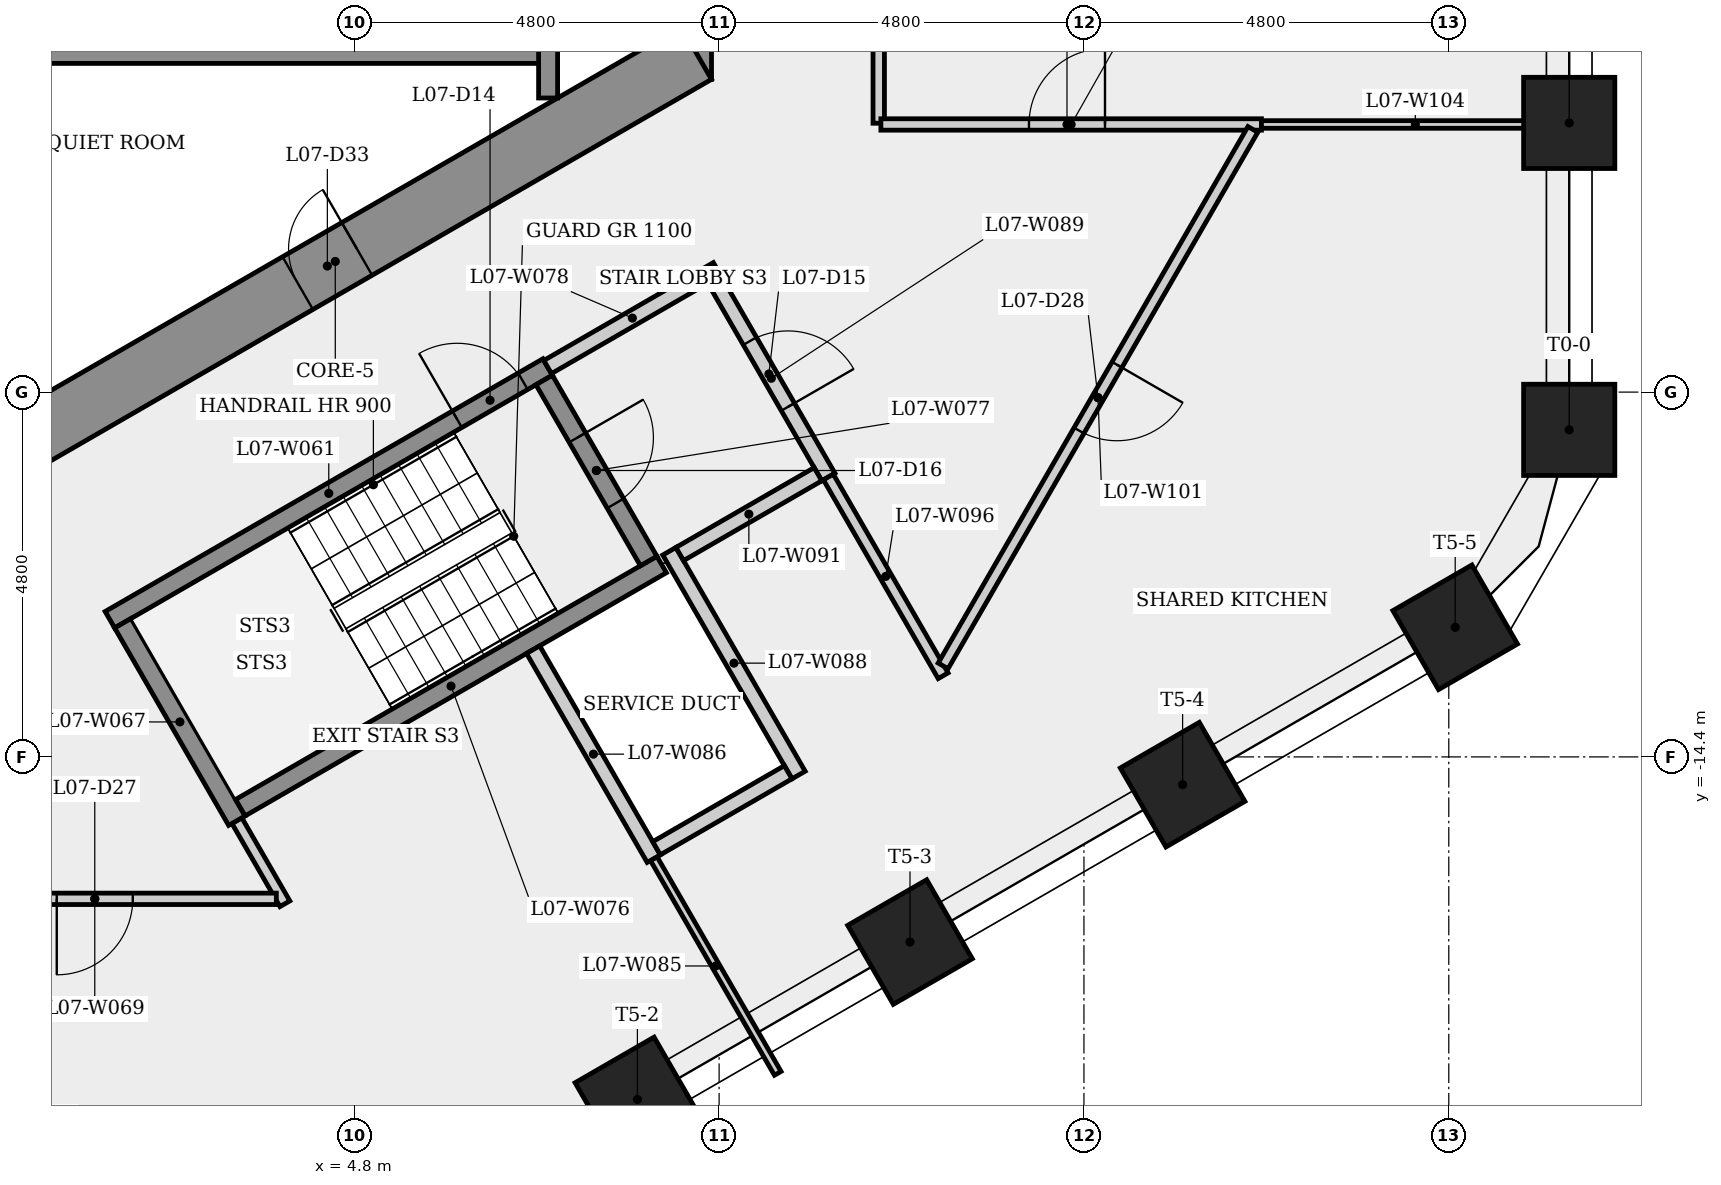
"""IFC4 building model, lengths in metres.
Left out: names, types, materials, properties, quantities, classifications, styles, units other than length and angle.
Written with IfcOpenShell. Run it as: python <this file> out.ifc"""

import sys

from ifc_helpers import new_model, si_unit, direction, frame, frame_2d, origin, origin_2d, place, context, subcontext, project, spatial, rectangle, extrude, element, fill, save


model = new_model("IFC4")
c1 = context("Model", 3, precision=1e-05, world=origin(), true_north=direction((0.0, 1.0)))
c2 = subcontext(c1, "Body", "Model", "MODEL_VIEW")
j1 = project(units=[si_unit("LENGTHUNIT", "METRE"), si_unit("PLANEANGLEUNIT", "RADIAN")], contexts=[c1])
p1 = place(None, origin())
s1 = spatial("IfcSite", under=j1, at=p1, CompositionType="ELEMENT")
p2 = place(p1, origin())
s2 = spatial("IfcBuilding", under=s1, at=p2, CompositionType="ELEMENT")
p3 = place(p2, frame((0.0, 0.0, 32.3)))
s3 = spatial("IfcBuildingStorey", under=s2, at=p3, CompositionType="ELEMENT", Elevation=32.3)
p4 = place(p3, frame((9.1, -5.485, 0.0), z_axis=(0.0, 0.0, 1.0), x_axis=(0.0, 1.0, 0.0)))
e1 = element("IfcWall", 1, at=p4, inside=s3, PredefinedType="SHEAR", context=c2, shape_type="SweptSolid", body=[
    extrude(rectangle(XDim=10.97, YDim=0.8, at=frame_2d((5.485, 0.0))), origin(), (0.0, 0.0, 1.0), 3.4),
])
p5 = place(p4, frame((4.685, 0.0, 0.0)))
e2 = element("IfcOpeningElement", 2, at=p5, cuts=e1, PredefinedType="OPENING", context=c2, shape_type="SweptSolid", body=[
    extrude(rectangle(XDim=1.6, YDim=2.1, at=frame_2d((0.8, 1.05))), frame((0.0, 0.41, 0.0), z_axis=(0.0, -1.0, 0.0), x_axis=(1.0, 0.0, 0.0)), (0.0, 0.0, 1.0), 0.82),
])
p6 = place(p3, frame((-0.2, -10.623, 0.0), z_axis=(0.0, 0.0, 1.0), x_axis=(0.866023993627, 0.500002442456, 0.0)))
e3 = element("IfcWall", 3, at=p6, inside=s3, PredefinedType="SHEAR", context=c2, shape_type="SweptSolid", body=[
    extrude(rectangle(XDim=10.97, YDim=0.8, at=frame_2d((5.485, 0.0))), origin(), (0.0, 0.0, 1.0), 3.4),
])
p7 = place(p6, frame((4.914, 0.0, 0.0)))
e4 = element("IfcOpeningElement", 4, at=p7, cuts=e3, PredefinedType="OPENING", context=c2, shape_type="SweptSolid", body=[
    extrude(rectangle(XDim=0.9, YDim=2.1, at=frame_2d((0.45, 1.05))), frame((0.0, 0.41, 0.0), z_axis=(0.0, -1.0, 0.0), x_axis=(1.0, 0.0, 0.0)), (0.0, 0.0, 1.0), 0.82),
])
for number, where, z_axis, x_axis in (
    (5, (20.785, -10.097, 0.0), (0.0, 0.0, 1.0), (1.0, 0.0, 0.0)),
    (6, (20.785, -6.058, 0.0), (0.0, 0.0, 1.0), (1.0, 0.0, 0.0)),
    (7, (8.525, -18.907, 0.0), (0.0, 0.0, 1.0), (0.5, -0.866, 0.0)),
    (8, (12.111, -16.836, 0.0), (0.0, 0.0, 1.0), (0.5, -0.866, 0.0)),
    (9, (15.698, -14.765, 0.0), (0.0, 0.0, 1.0), (0.5, -0.866, 0.0)),
    (10, (19.285, -12.695, 0.0), (0.0, 0.0, 1.0), (0.5, -0.866, 0.0)),
):
    element("IfcColumn", number, at=place(p3, frame(where, z_axis=z_axis, x_axis=x_axis)), inside=s3, PredefinedType="COLUMN", context=c2, shape_type="SweptSolid", body=[
        extrude(rectangle(XDim=1.2, YDim=1.2, at=origin_2d()), origin(), (0.0, 0.0, 1.0), 3.4),
    ])
p8 = place(p3, frame((-7.225, -5.15, 0.0), z_axis=(0.0, 0.0, 1.0), x_axis=(1.0, 0.0, 0.0)))
e11 = element("IfcWall", 11, at=p8, inside=s3, PredefinedType="SHEAR", context=c2, shape_type="SweptSolid", body=[
    extrude(rectangle(XDim=14.7, YDim=0.25, at=frame_2d((7.35, 0.0))), origin(), (0.0, 0.0, 1.0), 3.05),
])
p9 = place(p3, frame((1.585, -12.595, 0.0), z_axis=(0.0, 0.0, 1.0), x_axis=(0.866036417653, 0.499980922934, 0.0)))
e12 = element("IfcWall", 12, at=p9, inside=s3, PredefinedType="SHEAR", context=c2, shape_type="SweptSolid", body=[
    extrude(rectangle(XDim=6.65, YDim=0.25, at=frame_2d((3.325, 0.0))), origin(), (0.0, 0.0, 1.0), 3.05),
])
p10 = place(p9, frame((5.275, 0.0, 0.0)))
e13 = element("IfcOpeningElement", 13, at=p10, cuts=e12, PredefinedType="OPENING", context=c2, shape_type="SweptSolid", body=[
    extrude(rectangle(XDim=1.0, YDim=2.1, at=frame_2d((0.5, 1.05))), frame((0.0, 0.135, 0.0), z_axis=(0.0, -1.0, 0.0), x_axis=(1.0, 0.0, 0.0)), (0.0, 0.0, 1.0), 0.27),
])
p11 = place(p3, frame((3.256, -15.239, 0.0), z_axis=(0.0, 0.0, 1.0), x_axis=(0.500006981563, -0.86602137294, 0.0)))
e14 = element("IfcWall", 14, at=p11, inside=s3, PredefinedType="PARTITIONING", context=c2, shape_type="SweptSolid", body=[
    extrude(rectangle(XDim=1.263, YDim=0.15, at=frame_2d((0.631, 0.0))), origin(), (0.0, 0.0, 1.0), 3.05),
])
p12 = place(p3, frame((3.256, -15.239, 0.0), z_axis=(0.0, 0.0, 1.0), x_axis=(-0.50002537861, 0.866010750942, 0.0)))
e15 = element("IfcWall", 15, at=p12, inside=s3, PredefinedType="SHEAR", context=c2, shape_type="SweptSolid", body=[
    extrude(rectangle(XDim=3.0, YDim=0.25, at=frame_2d((1.5, 0.0))), origin(), (0.0, 0.0, 1.0), 3.05),
])
p13 = place(p3, frame((3.774, -16.267, 0.0), z_axis=(0.0, 0.0, 1.0), x_axis=(-1.0, 0.0, 0.0)))
e16 = element("IfcWall", 16, at=p13, inside=s3, PredefinedType="PARTITIONING", context=c2, shape_type="SweptSolid", body=[
    extrude(rectangle(XDim=4.778, YDim=0.15, at=frame_2d((2.389, 0.0))), origin(), (0.0, 0.0, 1.0), 3.05),
])
p14 = place(p13, frame((1.889, 0.0, 0.0)))
e17 = element("IfcOpeningElement", 17, at=p14, cuts=e16, PredefinedType="OPENING", context=c2, shape_type="SweptSolid", body=[
    extrude(rectangle(XDim=1.0, YDim=2.1, at=frame_2d((0.5, 1.05))), frame((0.0, 0.085, 0.0), z_axis=(0.0, -1.0, 0.0), x_axis=(1.0, 0.0, 0.0)), (0.0, 0.0, 1.0), 0.17),
])
p15 = place(p3, frame((3.301, -15.068, 0.0), z_axis=(0.0, 0.0, 1.0), x_axis=(0.866035036182, 0.499983315828, 0.0)))
e18 = element("IfcWall", 18, at=p15, inside=s3, PredefinedType="SHEAR", context=c2, shape_type="SweptSolid", body=[
    extrude(rectangle(XDim=6.4, YDim=0.25, at=frame_2d((3.2, 0.0))), origin(), (0.0, 0.0, 1.0), 3.05),
])
p16 = place(p3, frame((7.298, -9.441, 0.0), z_axis=(0.0, 0.0, 1.0), x_axis=(0.500034990121, -0.866005201286, 0.0)))
e19 = element("IfcWall", 19, at=p16, inside=s3, PredefinedType="SHEAR", context=c2, shape_type="SweptSolid", body=[
    extrude(rectangle(XDim=2.75, YDim=0.25, at=frame_2d((1.375, 0.0))), origin(), (0.0, 0.0, 1.0), 3.05),
])
p17 = place(p16, frame((0.875, 0.0, 0.0)))
e20 = element("IfcOpeningElement", 20, at=p17, cuts=e19, PredefinedType="OPENING", context=c2, shape_type="SweptSolid", body=[
    extrude(rectangle(XDim=1.0, YDim=2.1, at=frame_2d((0.5, 1.05))), frame((0.0, 0.135, 0.0), z_axis=(0.0, -1.0, 0.0), x_axis=(1.0, 0.0, 0.0)), (0.0, 0.0, 1.0), 0.27),
])
p18 = place(p3, frame((7.344, -9.27, 0.0), z_axis=(0.0, 0.0, 1.0), x_axis=(0.866005588531, 0.500034319456, 0.0)))
e21 = element("IfcWall", 21, at=p18, inside=s3, PredefinedType="PARTITIONING", context=c2, shape_type="SweptSolid", body=[
    extrude(rectangle(XDim=2.575, YDim=0.2, at=frame_2d((1.288, 0.0))), origin(), (0.0, 0.0, 1.0), 3.05),
])
p19 = place(p3, frame((7.35, -1.925, 0.0), z_axis=(0.0, 0.0, 1.0), x_axis=(0.0, -1.0, 0.0)))
e22 = element("IfcWall", 22, at=p19, inside=s3, PredefinedType="SHEAR", context=c2, shape_type="SweptSolid", body=[
    extrude(rectangle(XDim=3.805, YDim=0.25, at=frame_2d((1.903, 0.0))), origin(), (0.0, 0.0, 1.0), 3.05),
])
p20 = place(p3, frame((8.74, -15.738, 0.0), z_axis=(0.0, 0.0, 1.0), x_axis=(0.499994537821, -0.866028557352, 0.0)))
e23 = element("IfcWall", 23, at=p20, inside=s3, PredefinedType="PARTITIONING", context=c2, shape_type="SweptSolid", body=[
    extrude(rectangle(XDim=3.262, YDim=0.1, at=frame_2d((1.631, 0.0))), origin(), (0.0, 0.0, 1.0), 3.05),
])
p21 = place(p3, frame((8.74, -15.739, 0.0), z_axis=(0.0, 0.0, 1.0), x_axis=(-0.500017526161, 0.866015284814, 0.0)))
e24 = element("IfcWall", 24, at=p21, inside=s3, PredefinedType="PLUMBINGWALL", context=c2, shape_type="SweptSolid", body=[
    extrude(rectangle(XDim=3.175, YDim=0.2, at=frame_2d((1.588, 0.0))), origin(), (0.0, 0.0, 1.0), 3.05),
])
p22 = place(p3, frame((8.945, -11.694, 0.0), z_axis=(0.0, 0.0, 1.0), x_axis=(0.500062241894, -0.865989465428, 0.0)))
e25 = element("IfcWall", 25, at=p22, inside=s3, PredefinedType="PLUMBINGWALL", context=c2, shape_type="SweptSolid", body=[
    extrude(rectangle(XDim=3.4, YDim=0.2, at=frame_2d((1.7, 0.0))), origin(), (0.0, 0.0, 1.0), 3.05),
])
p23 = place(p3, frame((9.537, -8.119, 0.0), z_axis=(0.0, 0.0, 1.0), x_axis=(0.499990139034, -0.866031096941, 0.0)))
e26 = element("IfcWall", 26, at=p23, inside=s3, PredefinedType="PARTITIONING", context=c2, shape_type="SweptSolid", body=[
    extrude(rectangle(XDim=3.0, YDim=0.2, at=frame_2d((1.5, 0.0))), origin(), (0.0, 0.0, 1.0), 3.05),
])
p24 = place(p23, frame((0.935, 0.0, 0.0)))
e27 = element("IfcOpeningElement", 27, at=p24, cuts=e26, PredefinedType="OPENING", context=c2, shape_type="SweptSolid", body=[
    extrude(rectangle(XDim=1.0, YDim=2.1, at=frame_2d((0.5, 1.05))), frame((0.0, 0.11, 0.0), z_axis=(0.0, -1.0, 0.0), x_axis=(1.0, 0.0, 0.0)), (0.0, 0.0, 1.0), 0.22),
])
p25 = place(p3, frame((10.509, -14.602, 0.0), z_axis=(0.0, 0.0, 1.0), x_axis=(-0.866010750942, -0.50002537861, 0.0)))
e28 = element("IfcWall", 28, at=p25, inside=s3, PredefinedType="PLUMBINGWALL", context=c2, shape_type="SweptSolid", body=[
    extrude(rectangle(XDim=2.0, YDim=0.2, at=frame_2d((1.0, 0.0))), origin(), (0.0, 0.0, 1.0), 3.05),
])
p26 = place(p3, frame((10.901, -10.681, 0.0), z_axis=(0.0, 0.0, 1.0), x_axis=(-0.866009402589, -0.500027713859, 0.0)))
e29 = element("IfcWall", 29, at=p26, inside=s3, PredefinedType="PARTITIONING", context=c2, shape_type="SweptSolid", body=[
    extrude(rectangle(XDim=2.1, YDim=0.2, at=frame_2d((1.05, 0.0))), origin(), (0.0, 0.0, 1.0), 3.05),
])
p27 = place(p3, frame((11.7, -6.062, 0.0), z_axis=(0.0, 0.0, 1.0), x_axis=(0.0, 1.0, 0.0)))
e30 = element("IfcWall", 30, at=p27, inside=s3, PredefinedType="PARTITIONING", context=c2, shape_type="SweptSolid", body=[
    extrude(rectangle(XDim=12.125, YDim=0.15, at=frame_2d((6.062, 0.0))), origin(), (0.0, 0.0, 1.0), 3.05),
])
p28 = place(p27, frame((7.595, 0.0, 0.0)))
e31 = element("IfcOpeningElement", 31, at=p28, cuts=e30, PredefinedType="OPENING", context=c2, shape_type="SweptSolid", body=[
    extrude(rectangle(XDim=1.0, YDim=2.1, at=frame_2d((0.5, 1.05))), frame((0.0, 0.085, 0.0), z_axis=(0.0, -1.0, 0.0), x_axis=(1.0, 0.0, 0.0)), (0.0, 0.0, 1.0), 0.17),
])
p29 = place(p3, frame((11.728, -6.079, 0.0), z_axis=(0.0, 0.0, 1.0), x_axis=(1.0, 0.0, 0.0)))
e32 = element("IfcWall", 32, at=p29, inside=s3, PredefinedType="PARTITIONING", context=c2, shape_type="SweptSolid", body=[
    extrude(rectangle(XDim=5.007, YDim=0.15, at=frame_2d((2.503, 0.0))), origin(), (0.0, 0.0, 1.0), 3.05),
])
p30 = place(p29, frame((1.948, 0.0, 0.0)))
e33 = element("IfcOpeningElement", 33, at=p30, cuts=e32, PredefinedType="OPENING", context=c2, shape_type="SweptSolid", body=[
    extrude(rectangle(XDim=1.0, YDim=2.1, at=frame_2d((0.5, 1.05))), frame((0.0, 0.085, 0.0), z_axis=(0.0, -1.0, 0.0), x_axis=(1.0, 0.0, 0.0)), (0.0, 0.0, 1.0), 0.17),
])
p31 = place(p3, frame((12.547, -13.332, 0.0), z_axis=(0.0, 0.0, 1.0), x_axis=(-0.499965068118, 0.866045570776, 0.0)))
e34 = element("IfcWall", 34, at=p31, inside=s3, PredefinedType="PARTITIONING", context=c2, shape_type="SweptSolid", body=[
    extrude(rectangle(XDim=3.02, YDim=0.15, at=frame_2d((1.51, 0.0))), origin(), (0.0, 0.0, 1.0), 3.05),
])
p32 = place(p3, frame((16.623, -6.144, 0.0), z_axis=(0.0, 0.0, 1.0), x_axis=(-0.500001609966, -0.866024474268, 0.0)))
e35 = element("IfcWall", 35, at=p32, inside=s3, PredefinedType="PARTITIONING", context=c2, shape_type="SweptSolid", body=[
    extrude(rectangle(XDim=8.151, YDim=0.15, at=frame_2d((4.075, 0.0))), origin(), (0.0, 0.0, 1.0), 3.05),
])
p33 = place(p32, frame((3.575, 0.0, 0.0)))
e36 = element("IfcOpeningElement", 36, at=p33, cuts=e35, PredefinedType="OPENING", context=c2, shape_type="SweptSolid", body=[
    extrude(rectangle(XDim=1.0, YDim=2.1, at=frame_2d((0.5, 1.05))), frame((0.0, 0.085, 0.0), z_axis=(0.0, -1.0, 0.0), x_axis=(1.0, 0.0, 0.0)), (0.0, 0.0, 1.0), 0.17),
])
p34 = place(p3, frame((20.785, -6.079, 0.0), z_axis=(0.0, 0.0, 1.0), x_axis=(-1.0, 0.0, 0.0)))
e37 = element("IfcWall", 37, at=p34, inside=s3, PredefinedType="PARTITIONING", context=c2, shape_type="SweptSolid", body=[
    extrude(rectangle(XDim=4.05, YDim=0.1, at=frame_2d((2.025, 0.0))), origin(), (0.0, 0.0, 1.0), 3.05),
])
p35 = place(p10, origin())
e38 = element("IfcDoor", 38, at=p35, inside=s3, OperationType="SINGLE_SWING_LEFT", PredefinedType="DOOR", context=c2, shape_type="SweptSolid", body=[
    extrude(rectangle(XDim=1.0, YDim=2.1, at=frame_2d((0.5, 1.05))), frame((0.0, 0.025, 0.0), z_axis=(0.0, -1.0, 0.0), x_axis=(1.0, 0.0, 0.0)), (0.0, 0.0, 1.0), 0.05),
])
fill(e13, e38)
p36 = place(p24, origin())
e39 = element("IfcDoor", 39, at=p36, inside=s3, OperationType="SINGLE_SWING_RIGHT", PredefinedType="DOOR", context=c2, shape_type="SweptSolid", body=[
    extrude(rectangle(XDim=1.0, YDim=2.1, at=frame_2d((0.5, 1.05))), frame((0.0, 0.025, 0.0), z_axis=(0.0, -1.0, 0.0), x_axis=(1.0, 0.0, 0.0)), (0.0, 0.0, 1.0), 0.05),
])
fill(e27, e39)
p37 = place(p17, origin())
e40 = element("IfcDoor", 40, at=p37, inside=s3, OperationType="SINGLE_SWING_LEFT", PredefinedType="DOOR", context=c2, shape_type="SweptSolid", body=[
    extrude(rectangle(XDim=1.0, YDim=2.1, at=frame_2d((0.5, 1.05))), frame((0.0, 0.025, 0.0), z_axis=(0.0, -1.0, 0.0), x_axis=(1.0, 0.0, 0.0)), (0.0, 0.0, 1.0), 0.05),
])
fill(e20, e40)
p38 = place(p30, origin())
e41 = element("IfcDoor", 41, at=p38, inside=s3, OperationType="SINGLE_SWING_RIGHT", PredefinedType="DOOR", context=c2, shape_type="SweptSolid", body=[
    extrude(rectangle(XDim=1.0, YDim=2.1, at=frame_2d((0.5, 1.05))), frame((0.0, 0.025, 0.0), z_axis=(0.0, -1.0, 0.0), x_axis=(1.0, 0.0, 0.0)), (0.0, 0.0, 1.0), 0.05),
])
fill(e33, e41)
p39 = place(p14, origin())
e42 = element("IfcDoor", 42, at=p39, inside=s3, OperationType="SINGLE_SWING_RIGHT", PredefinedType="DOOR", context=c2, shape_type="SweptSolid", body=[
    extrude(rectangle(XDim=1.0, YDim=2.1, at=frame_2d((0.5, 1.05))), frame((0.0, 0.025, 0.0), z_axis=(0.0, -1.0, 0.0), x_axis=(1.0, 0.0, 0.0)), (0.0, 0.0, 1.0), 0.05),
])
fill(e17, e42)
p40 = place(p33, origin())
e43 = element("IfcDoor", 43, at=p40, inside=s3, OperationType="SINGLE_SWING_LEFT", PredefinedType="DOOR", context=c2, shape_type="SweptSolid", body=[
    extrude(rectangle(XDim=1.0, YDim=2.1, at=frame_2d((0.5, 1.05))), frame((0.0, 0.025, 0.0), z_axis=(0.0, -1.0, 0.0), x_axis=(1.0, 0.0, 0.0)), (0.0, 0.0, 1.0), 0.05),
])
fill(e36, e43)
p41 = place(p7, origin())
e44 = element("IfcDoor", 44, at=p41, inside=s3, OperationType="SINGLE_SWING_RIGHT", PredefinedType="DOOR", context=c2, shape_type="SweptSolid", body=[
    extrude(rectangle(XDim=0.9, YDim=2.1, at=frame_2d((0.45, 1.05))), frame((0.0, 0.025, 0.0), z_axis=(0.0, -1.0, 0.0), x_axis=(1.0, 0.0, 0.0)), (0.0, 0.0, 1.0), 0.05),
])
fill(e4, e44)
save(model, sys.argv[1])
